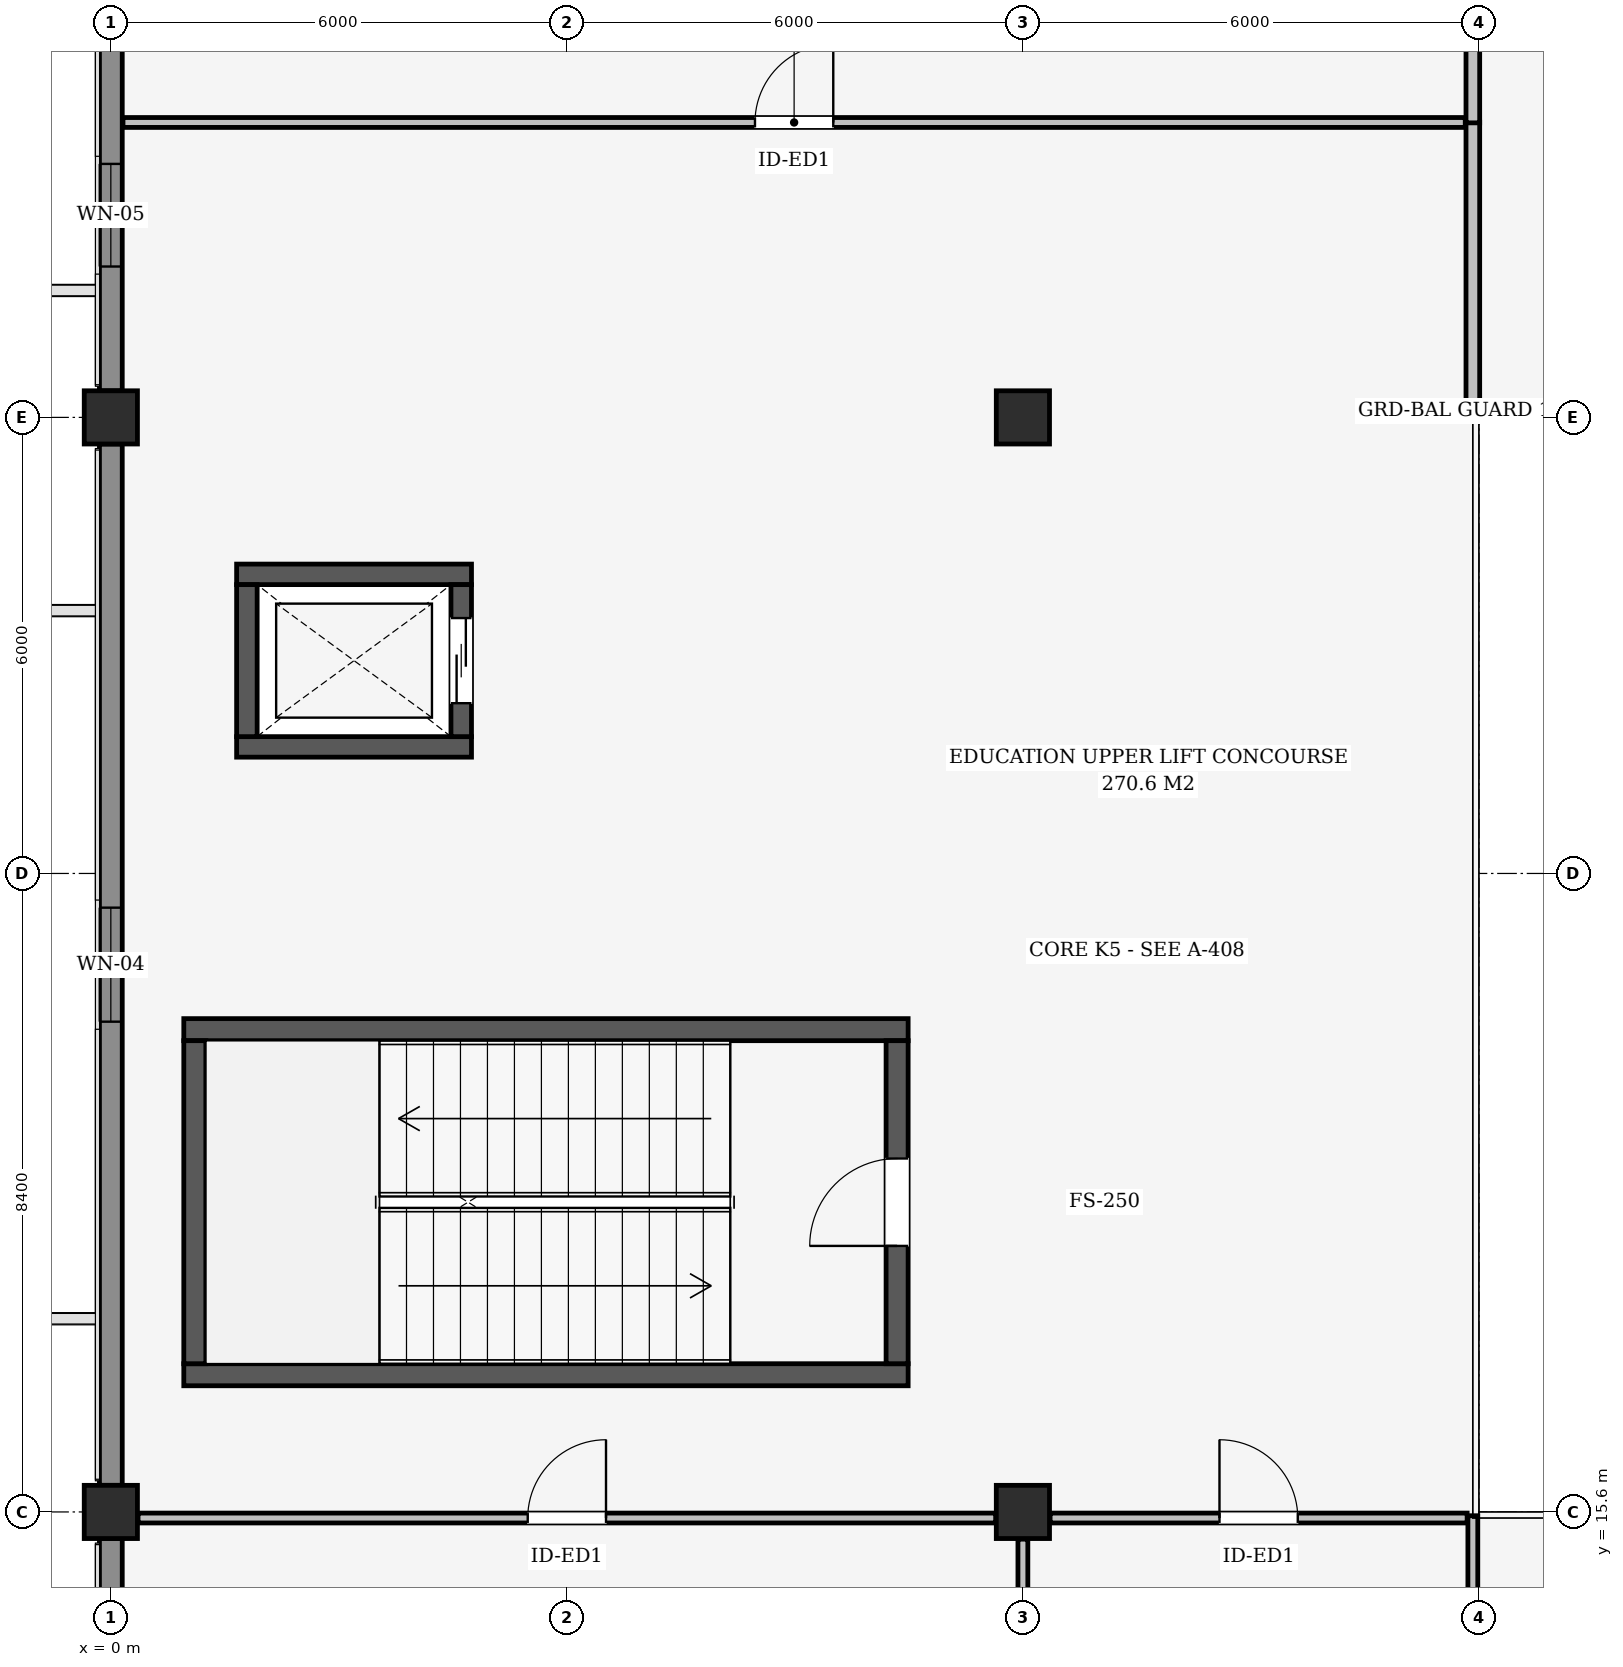
"""IFC4 building model, lengths in metres.
Left out: names, types, materials, properties, quantities, classifications, styles, units other than length and angle.
Written with IfcOpenShell. Run it as: python <this file> out.ifc"""

import sys

from ifc_helpers import new_model, si_unit, direction, frame, frame_2d, origin, origin_2d, place, context, subcontext, project, spatial, rectangle, extrude, element, fill, save


model = new_model("IFC4")
c1 = context("Model", 3, precision=1e-05, world=origin(), true_north=direction((0.0, 1.0)))
c2 = subcontext(c1, "Body", "Model", "MODEL_VIEW")
j1 = project(units=[si_unit("LENGTHUNIT", "METRE"), si_unit("PLANEANGLEUNIT", "RADIAN")], contexts=[c1])
p1 = place(None, origin())
s1 = spatial("IfcSite", under=j1, at=p1, CompositionType="ELEMENT")
p2 = place(p1, origin())
s2 = spatial("IfcBuilding", under=s1, at=p2, CompositionType="ELEMENT")
p3 = place(p2, frame((0.0, 0.0, 4.8)))
s3 = spatial("IfcBuildingStorey", under=s2, at=p3, CompositionType="ELEMENT", Elevation=4.8)
for number, where, z_axis, x_axis in (
    (1, (0.0, 15.6, 0.0), (0.0, 0.0, 1.0), (1.0, 0.0, 0.0)),
    (2, (0.0, 30.0, 0.0), (0.0, 0.0, 1.0), (1.0, 0.0, 0.0)),
    (3, (12.0, 15.6, 0.0), (0.0, 0.0, 1.0), (1.0, 0.0, 0.0)),
    (4, (12.0, 30.0, 0.0), (0.0, 0.0, 1.0), (1.0, 0.0, 0.0)),
):
    element("IfcColumn", number, at=place(p3, frame(where, z_axis=z_axis, x_axis=x_axis)), inside=s3, PredefinedType="COLUMN", context=c2, shape_type="SweptSolid", body=[
        extrude(rectangle(XDim=0.7, YDim=0.7, at=origin_2d()), origin(), (0.0, 0.0, 1.0), 4.5),
    ])
p4 = place(p3, frame((0.0, 0.4, 0.0), z_axis=(0.0, 0.0, 1.0), x_axis=(0.0, 1.0, 0.0)))
e5 = element("IfcWall", 5, at=p4, inside=s3, PredefinedType="SOLIDWALL", context=c2, shape_type="SweptSolid", body=[
    extrude(rectangle(XDim=14.85, YDim=0.3, at=frame_2d((7.425, 0.0))), origin(), (0.0, 0.0, 1.0), 3.384),
])
p5 = place(p4, frame((6.375, 0.0, 0.85)))
e6 = element("IfcOpeningElement", 6, at=p5, cuts=e5, PredefinedType="OPENING", context=c2, shape_type="SweptSolid", body=[
    extrude(rectangle(XDim=2.1, YDim=1.8, at=frame_2d((1.05, 0.9))), frame((0.0, 0.16, 0.0), z_axis=(0.0, -1.0, 0.0), x_axis=(1.0, 0.0, 0.0)), (0.0, 0.0, 1.0), 0.32),
])
p6 = place(p3, frame((0.0, 15.95, 0.0), z_axis=(0.0, 0.0, 1.0), x_axis=(0.0, 1.0, 0.0)))
e7 = element("IfcWall", 7, at=p6, inside=s3, PredefinedType="SOLIDWALL", context=c2, shape_type="SweptSolid", body=[
    extrude(rectangle(XDim=13.7, YDim=0.3, at=frame_2d((6.85, 0.0))), origin(), (0.0, 0.0, 1.0), 3.619),
])
p7 = place(p6, frame((6.1, 0.0, 0.85)))
e8 = element("IfcOpeningElement", 8, at=p7, cuts=e7, PredefinedType="OPENING", context=c2, shape_type="SweptSolid", body=[
    extrude(rectangle(XDim=1.5, YDim=1.65, at=frame_2d((0.75, 0.825))), frame((0.0, 0.16, 0.0), z_axis=(0.0, -1.0, 0.0), x_axis=(1.0, 0.0, 0.0)), (0.0, 0.0, 1.0), 0.32),
])
p8 = place(p3, frame((0.0, 30.35, 0.0), z_axis=(0.0, 0.0, 1.0), x_axis=(0.0, 1.0, 0.0)))
e9 = element("IfcWall", 9, at=p8, inside=s3, PredefinedType="SOLIDWALL", context=c2, shape_type="SweptSolid", body=[
    extrude(rectangle(XDim=8.25, YDim=0.3, at=frame_2d((4.125, 0.0))), origin(), (0.0, 0.0, 1.0), 3.619),
])
p9 = place(p8, frame((1.635, 0.0, 0.85)))
e10 = element("IfcOpeningElement", 10, at=p9, cuts=e9, PredefinedType="OPENING", context=c2, shape_type="SweptSolid", body=[
    extrude(rectangle(XDim=1.35, YDim=1.5, at=frame_2d((0.675, 0.75))), frame((0.0, 0.16, 0.0), z_axis=(0.0, -1.0, 0.0), x_axis=(1.0, 0.0, 0.0)), (0.0, 0.0, 1.0), 0.32),
])
for number, where, z_axis, x_axis in (
    (11, (0.96, 17.405, 0.0), (0.0, 0.0, 1.0), (1.0, 0.0, 0.0)),
    (12, (0.96, 21.945, 0.0), (0.0, 0.0, 1.0), (1.0, 0.0, 0.0)),
):
    element("IfcWall", number, at=place(p3, frame(where, z_axis=z_axis, x_axis=x_axis)), inside=s3, PredefinedType="SHEAR", context=c2, shape_type="SweptSolid", body=[
        extrude(rectangle(XDim=9.53, YDim=0.29, at=frame_2d((4.765, 0.0))), origin(), (0.0, 0.0, 1.0), 4.25),
    ])
p10 = place(p3, frame((1.105, 17.55, 0.0), z_axis=(0.0, 0.0, 1.0), x_axis=(0.0, 1.0, 0.0)))
e13 = element("IfcWall", 13, at=p10, inside=s3, PredefinedType="SHEAR", context=c2, shape_type="SweptSolid", body=[
    extrude(rectangle(XDim=4.25, YDim=0.29, at=frame_2d((2.125, 0.0))), origin(), (0.0, 0.0, 1.0), 4.25),
])
p11 = place(p3, frame((10.345, 17.55, 0.0), z_axis=(0.0, 0.0, 1.0), x_axis=(0.0, 1.0, 0.0)))
e14 = element("IfcWall", 14, at=p11, inside=s3, PredefinedType="SHEAR", context=c2, shape_type="SweptSolid", body=[
    extrude(rectangle(XDim=4.25, YDim=0.29, at=frame_2d((2.125, 0.0))), origin(), (0.0, 0.0, 1.0), 4.25),
])
p12 = place(p11, frame((1.55, 0.0, 0.0)))
e15 = element("IfcOpeningElement", 15, at=p12, cuts=e14, PredefinedType="OPENING", context=c2, shape_type="SweptSolid", body=[
    extrude(rectangle(XDim=1.15, YDim=2.15, at=frame_2d((0.575, 1.075))), frame((0.0, 0.155, 0.0), z_axis=(0.0, -1.0, 0.0), x_axis=(1.0, 0.0, 0.0)), (0.0, 0.0, 1.0), 0.31),
])
for number, where, z_axis, x_axis in (
    (16, (1.655, 25.665, 0.0), (0.0, 0.0, 1.0), (1.0, 0.0, 0.0)),
    (17, (1.655, 27.935, 0.0), (0.0, 0.0, 1.0), (1.0, 0.0, 0.0)),
):
    element("IfcWall", number, at=place(p3, frame(where, z_axis=z_axis, x_axis=x_axis)), inside=s3, PredefinedType="SHEAR", context=c2, shape_type="SweptSolid", body=[
        extrude(rectangle(XDim=3.09, YDim=0.27, at=frame_2d((1.545, 0.0))), origin(), (0.0, 0.0, 1.0), 4.25),
    ])
p13 = place(p3, frame((1.79, 25.8, 0.0), z_axis=(0.0, 0.0, 1.0), x_axis=(0.0, 1.0, 0.0)))
e18 = element("IfcWall", 18, at=p13, inside=s3, PredefinedType="SHEAR", context=c2, shape_type="SweptSolid", body=[
    extrude(rectangle(XDim=2.0, YDim=0.27, at=frame_2d((1.0, 0.0))), origin(), (0.0, 0.0, 1.0), 4.25),
])
p14 = place(p3, frame((4.61, 25.8, 0.0), z_axis=(0.0, 0.0, 1.0), x_axis=(0.0, 1.0, 0.0)))
e19 = element("IfcWall", 19, at=p14, inside=s3, PredefinedType="SHEAR", context=c2, shape_type="SweptSolid", body=[
    extrude(rectangle(XDim=2.0, YDim=0.27, at=frame_2d((1.0, 0.0))), origin(), (0.0, 0.0, 1.0), 4.25),
])
p15 = place(p14, frame((0.44, 0.0, 0.0)))
e20 = element("IfcOpeningElement", 20, at=p15, cuts=e19, PredefinedType="OPENING", context=c2, shape_type="SweptSolid", body=[
    extrude(rectangle(XDim=1.12, YDim=2.15, at=frame_2d((0.56, 1.075))), frame((0.0, 0.145, 0.0), z_axis=(0.0, -1.0, 0.0), x_axis=(1.0, 0.0, 0.0)), (0.0, 0.0, 1.0), 0.29),
])
p16 = place(p3, frame((17.92, 0.16, 0.0), z_axis=(0.0, 0.0, 1.0), x_axis=(0.0, 1.0, 0.0)))
e21 = element("IfcWall", 21, at=p16, inside=s3, PredefinedType="PARTITIONING", context=c2, shape_type="SweptSolid", body=[
    extrude(rectangle(XDim=15.39, YDim=0.13, at=frame_2d((7.695, 0.0))), origin(), (0.0, 0.0, 1.0), 3.686),
])
p17 = place(p16, frame((6.935, 0.0, 0.0)))
e22 = element("IfcOpeningElement", 22, at=p17, cuts=e21, PredefinedType="OPENING", context=c2, shape_type="SweptSolid", body=[
    extrude(rectangle(XDim=1.52, YDim=2.24, at=frame_2d((0.76, 1.12))), frame((0.0, 0.075, 0.0), z_axis=(0.0, -1.0, 0.0), x_axis=(1.0, 0.0, 0.0)), (0.0, 0.0, 1.0), 0.15),
])
p18 = place(p3, frame((17.92, 30.075, 0.0), z_axis=(0.0, 0.0, 1.0), x_axis=(0.0, 1.0, 0.0)))
e23 = element("IfcWall", 23, at=p18, inside=s3, PredefinedType="PARTITIONING", context=c2, shape_type="SweptSolid", body=[
    extrude(rectangle(XDim=3.81, YDim=0.18, at=frame_2d((1.905, 0.0))), origin(), (0.0, 0.0, 1.0), 3.773),
])
p19 = place(p3, frame((17.92, 33.875, 0.0), z_axis=(0.0, 0.0, 1.0), x_axis=(0.0, 1.0, 0.0)))
e24 = element("IfcWall", 24, at=p19, inside=s3, PredefinedType="PARTITIONING", context=c2, shape_type="SweptSolid", body=[
    extrude(rectangle(XDim=5.075, YDim=0.18, at=frame_2d((2.538, 0.0))), origin(), (0.0, 0.0, 1.0), 3.773),
])
p20 = place(p3, frame((0.358, 15.52, 0.0), z_axis=(0.0, 0.0, 1.0), x_axis=(1.0, 0.0, 0.0)))
e25 = element("IfcWall", 25, at=p20, inside=s3, PredefinedType="PARTITIONING", context=c2, shape_type="SweptSolid", body=[
    extrude(rectangle(XDim=11.284, YDim=0.13, at=frame_2d((5.642, 0.0))), origin(), (0.0, 0.0, 1.0), 3.623),
])
p21 = place(p20, frame((5.127, 0.0, 0.0)))
e26 = element("IfcOpeningElement", 26, at=p21, cuts=e25, PredefinedType="OPENING", context=c2, shape_type="SweptSolid", body=[
    extrude(rectangle(XDim=1.03, YDim=2.18, at=frame_2d((0.515, 1.09))), frame((0.0, 0.075, 0.0), z_axis=(0.0, -1.0, 0.0), x_axis=(1.0, 0.0, 0.0)), (0.0, 0.0, 1.0), 0.15),
])
p22 = place(p3, frame((12.358, 15.52, 0.0), z_axis=(0.0, 0.0, 1.0), x_axis=(1.0, 0.0, 0.0)))
e27 = element("IfcWall", 27, at=p22, inside=s3, PredefinedType="PARTITIONING", context=c2, shape_type="SweptSolid", body=[
    extrude(rectangle(XDim=5.487, YDim=0.13, at=frame_2d((2.744, 0.0))), origin(), (0.0, 0.0, 1.0), 2.93),
])
p23 = place(p22, frame((2.229, 0.0, 0.0)))
e28 = element("IfcOpeningElement", 28, at=p23, cuts=e27, PredefinedType="OPENING", context=c2, shape_type="SweptSolid", body=[
    extrude(rectangle(XDim=1.03, YDim=2.18, at=frame_2d((0.515, 1.09))), frame((0.0, 0.075, 0.0), z_axis=(0.0, -1.0, 0.0), x_axis=(1.0, 0.0, 0.0)), (0.0, 0.0, 1.0), 0.15),
])
p24 = place(p3, frame((0.16, 33.88, 0.0), z_axis=(0.0, 0.0, 1.0), x_axis=(1.0, 0.0, 0.0)))
e29 = element("IfcWall", 29, at=p24, inside=s3, PredefinedType="PARTITIONING", context=c2, shape_type="SweptSolid", body=[
    extrude(rectangle(XDim=17.66, YDim=0.13, at=frame_2d((8.83, 0.0))), origin(), (0.0, 0.0, 1.0), 4.23),
])
p25 = place(p24, frame((8.315, 0.0, 0.0)))
e30 = element("IfcOpeningElement", 30, at=p25, cuts=e29, PredefinedType="OPENING", context=c2, shape_type="SweptSolid", body=[
    extrude(rectangle(XDim=1.03, YDim=2.18, at=frame_2d((0.515, 1.09))), frame((0.0, 0.075, 0.0), z_axis=(0.0, -1.0, 0.0), x_axis=(1.0, 0.0, 0.0)), (0.0, 0.0, 1.0), 0.15),
])
p26 = place(p3, frame((12.0, 0.408, 0.0), z_axis=(0.0, 0.0, 1.0), x_axis=(0.0, 1.0, 0.0)))
e31 = element("IfcWall", 31, at=p26, inside=s3, PredefinedType="PARTITIONING", context=c2, shape_type="SweptSolid", body=[
    extrude(rectangle(XDim=14.834, YDim=0.13, at=frame_2d((7.417, 0.0))), origin(), (0.0, 0.0, 1.0), 3.384),
])
p27 = place(p7, origin())
e32 = element("IfcWindow", 32, at=p27, inside=s3, PartitioningType="SINGLE_PANEL", PredefinedType="WINDOW", context=c2, shape_type="SweptSolid", body=[
    extrude(rectangle(XDim=1.5, YDim=1.65, at=frame_2d((0.75, 0.825))), frame((0.0, 0.03, 0.0), z_axis=(0.0, -1.0, 0.0), x_axis=(1.0, 0.0, 0.0)), (0.0, 0.0, 1.0), 0.06),
])
fill(e8, e32)
p28 = place(p9, origin())
e33 = element("IfcWindow", 33, at=p28, inside=s3, PartitioningType="SINGLE_PANEL", PredefinedType="WINDOW", context=c2, shape_type="SweptSolid", body=[
    extrude(rectangle(XDim=1.35, YDim=1.5, at=frame_2d((0.675, 0.75))), frame((0.0, 0.03, 0.0), z_axis=(0.0, -1.0, 0.0), x_axis=(1.0, 0.0, 0.0)), (0.0, 0.0, 1.0), 0.06),
])
fill(e10, e33)
p29 = place(p12, origin())
e34 = element("IfcDoor", 34, at=p29, inside=s3, OperationType="SINGLE_SWING_LEFT", PredefinedType="DOOR", context=c2, shape_type="SweptSolid", body=[
    extrude(rectangle(XDim=1.15, YDim=2.15, at=frame_2d((0.575, 1.075))), frame((0.0, 0.025, 0.0), z_axis=(0.0, -1.0, 0.0), x_axis=(1.0, 0.0, 0.0)), (0.0, 0.0, 1.0), 0.05),
])
fill(e15, e34)
p30 = place(p15, origin())
e35 = element("IfcDoor", 35, at=p30, inside=s3, OperationType="SLIDING_TO_LEFT", PredefinedType="DOOR", context=c2, shape_type="SweptSolid", body=[
    extrude(rectangle(XDim=1.12, YDim=2.15, at=frame_2d((0.56, 1.075))), frame((0.0, 0.025, 0.0), z_axis=(0.0, -1.0, 0.0), x_axis=(1.0, 0.0, 0.0)), (0.0, 0.0, 1.0), 0.05),
])
fill(e20, e35)
p31 = place(p21, origin())
e36 = element("IfcDoor", 36, at=p31, inside=s3, OperationType="SINGLE_SWING_RIGHT", PredefinedType="DOOR", context=c2, shape_type="SweptSolid", body=[
    extrude(rectangle(XDim=1.03, YDim=2.18, at=frame_2d((0.515, 1.09))), frame((0.0, 0.025, 0.0), z_axis=(0.0, -1.0, 0.0), x_axis=(1.0, 0.0, 0.0)), (0.0, 0.0, 1.0), 0.05),
])
fill(e26, e36)
p32 = place(p23, origin())
e37 = element("IfcDoor", 37, at=p32, inside=s3, OperationType="SINGLE_SWING_LEFT", PredefinedType="DOOR", context=c2, shape_type="SweptSolid", body=[
    extrude(rectangle(XDim=1.03, YDim=2.18, at=frame_2d((0.515, 1.09))), frame((0.0, 0.025, 0.0), z_axis=(0.0, -1.0, 0.0), x_axis=(1.0, 0.0, 0.0)), (0.0, 0.0, 1.0), 0.05),
])
fill(e28, e37)
p33 = place(p25, origin())
e38 = element("IfcDoor", 38, at=p33, inside=s3, OperationType="SINGLE_SWING_RIGHT", PredefinedType="DOOR", context=c2, shape_type="SweptSolid", body=[
    extrude(rectangle(XDim=1.03, YDim=2.18, at=frame_2d((0.515, 1.09))), frame((0.0, 0.025, 0.0), z_axis=(0.0, -1.0, 0.0), x_axis=(1.0, 0.0, 0.0)), (0.0, 0.0, 1.0), 0.05),
])
fill(e30, e38)
save(model, sys.argv[1])
